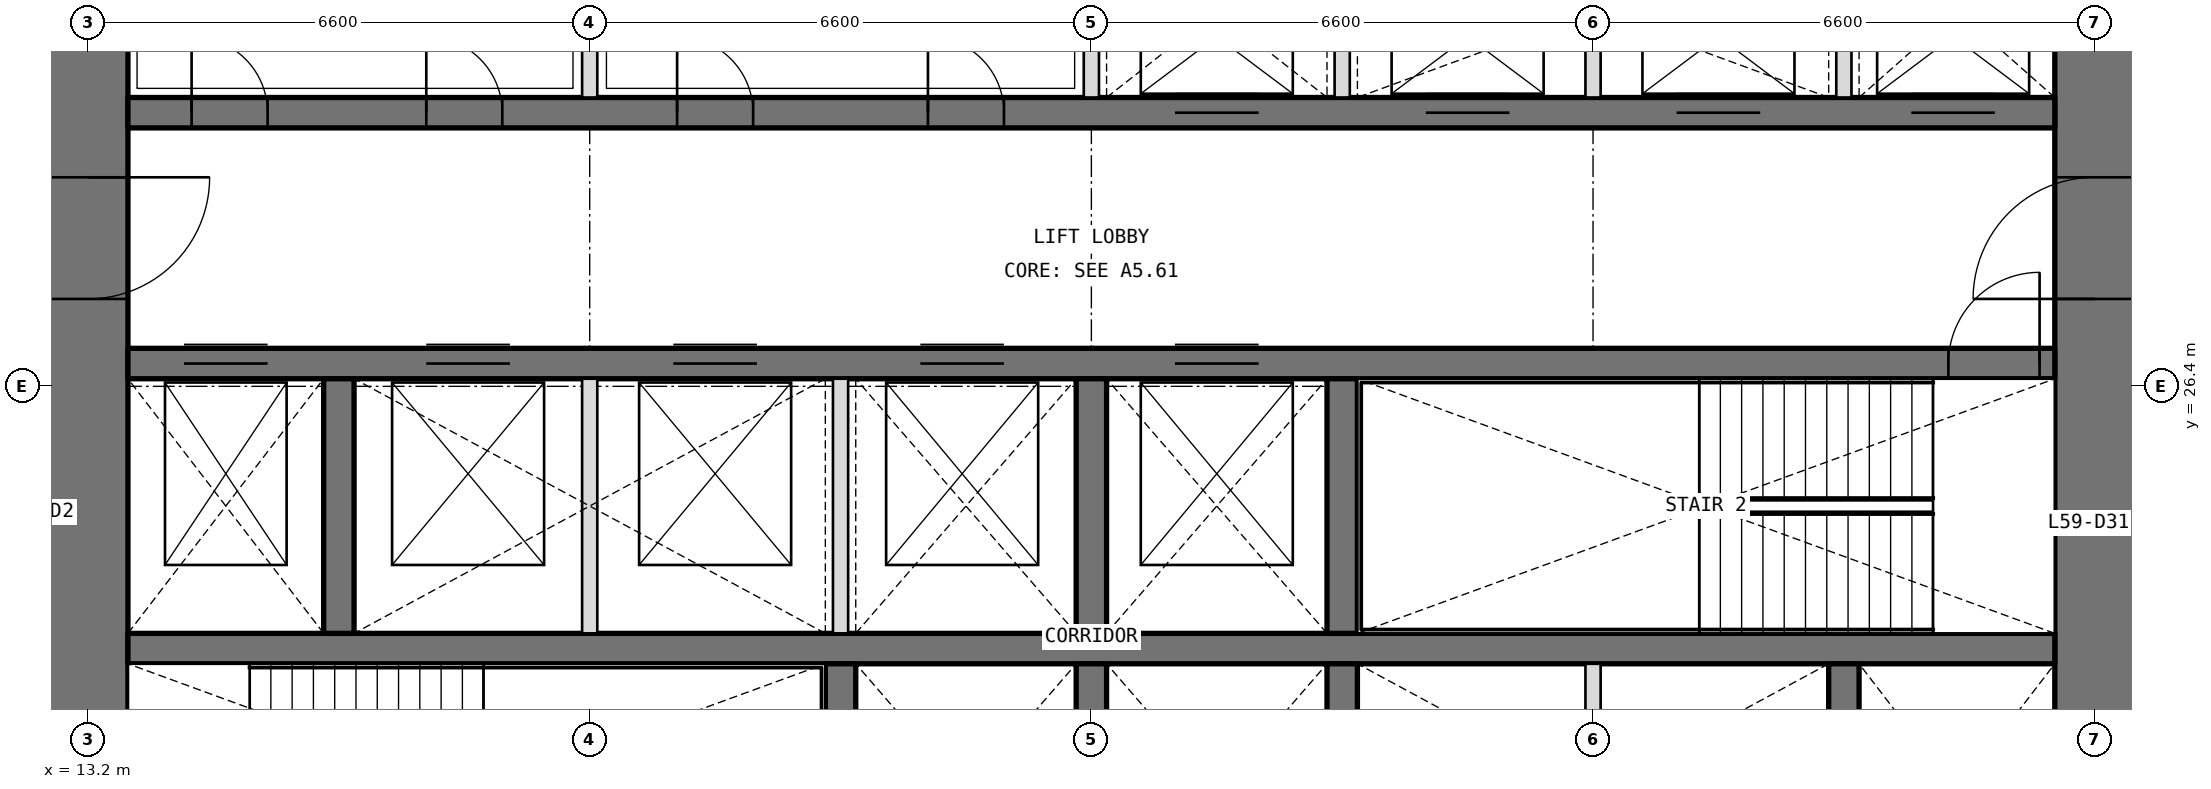
"""IFC4 building model, lengths in metres.
Left out: names, types, materials, properties, quantities, classifications, styles, units other than length and angle.
Written with IfcOpenShell. Run it as: python <this file> out.ifc"""

import sys

from ifc_helpers import new_model, si_unit, direction, frame, frame_2d, origin, place, context, subcontext, project, spatial, rectangle, extrude, element, fill, save


model = new_model("IFC4")
c1 = context("Model", 3, precision=1e-05, world=origin(), true_north=direction((0.0, 1.0)))
c2 = subcontext(c1, "Body", "Model", "MODEL_VIEW")
j1 = project(units=[si_unit("LENGTHUNIT", "METRE"), si_unit("PLANEANGLEUNIT", "RADIAN")], contexts=[c1])
p1 = place(None, origin())
s1 = spatial("IfcSite", under=j1, at=p1, CompositionType="ELEMENT")
p2 = place(p1, origin())
s2 = spatial("IfcBuilding", under=s1, at=p2, CompositionType="ELEMENT")
p3 = place(p2, frame((0.0, 0.0, 258.6)))
s3 = spatial("IfcBuildingStorey", under=s2, at=p3, CompositionType="ELEMENT", Elevation=258.6)
p4 = place(p3, frame((39.6, 13.725, 0.0), z_axis=(0.0, 0.0, 1.0), x_axis=(0.0, 1.0, 0.0)))
e1 = element("IfcWall", 1, at=p4, inside=s3, PredefinedType="SHEAR", context=c2, shape_type="SweptSolid", body=[
    extrude(rectangle(XDim=18.75, YDim=1.05, at=frame_2d((9.375, 0.0))), origin(), (0.0, 0.0, 1.0), 4.2),
])
p5 = place(p4, frame((3.025, 0.0, 0.0)))
e2 = element("IfcOpeningElement", 2, at=p5, cuts=e1, PredefinedType="OPENING", context=c2, shape_type="SweptSolid", body=[
    extrude(rectangle(XDim=1.6, YDim=2.1, at=frame_2d((0.8, 1.05))), frame((0.0, 0.535, 0.0), z_axis=(0.0, -1.0, 0.0), x_axis=(1.0, 0.0, 0.0)), (0.0, 0.0, 1.0), 1.07),
])
p6 = place(p4, frame((13.825, 0.0, 0.0)))
e3 = element("IfcOpeningElement", 3, at=p6, cuts=e1, PredefinedType="OPENING", context=c2, shape_type="SweptSolid", body=[
    extrude(rectangle(XDim=1.6, YDim=2.1, at=frame_2d((0.8, 1.05))), frame((0.0, 0.535, 0.0), z_axis=(0.0, -1.0, 0.0), x_axis=(1.0, 0.0, 0.0)), (0.0, 0.0, 1.0), 1.07),
])
p7 = place(p3, frame((13.2, 32.475, 0.0), z_axis=(0.0, 0.0, 1.0), x_axis=(0.0, -1.0, 0.0)))
e4 = element("IfcWall", 4, at=p7, inside=s3, PredefinedType="SHEAR", context=c2, shape_type="SweptSolid", body=[
    extrude(rectangle(XDim=18.75, YDim=1.05, at=frame_2d((9.375, 0.0))), origin(), (0.0, 0.0, 1.0), 4.2),
])
p8 = place(p7, frame((14.125, 0.0, 0.0)))
e5 = element("IfcOpeningElement", 5, at=p8, cuts=e4, PredefinedType="OPENING", context=c2, shape_type="SweptSolid", body=[
    extrude(rectangle(XDim=1.6, YDim=2.1, at=frame_2d((0.8, 1.05))), frame((0.0, 0.535, 0.0), z_axis=(0.0, -1.0, 0.0), x_axis=(1.0, 0.0, 0.0)), (0.0, 0.0, 1.0), 1.07),
])
p9 = place(p7, frame((3.325, 0.0, 0.0)))
e6 = element("IfcOpeningElement", 6, at=p9, cuts=e4, PredefinedType="OPENING", context=c2, shape_type="SweptSolid", body=[
    extrude(rectangle(XDim=1.6, YDim=2.1, at=frame_2d((0.8, 1.05))), frame((0.0, 0.535, 0.0), z_axis=(0.0, -1.0, 0.0), x_axis=(1.0, 0.0, 0.0)), (0.0, 0.0, 1.0), 1.07),
])
p10 = place(p3, frame((13.725, 22.95, 0.0), z_axis=(0.0, 0.0, 1.0), x_axis=(1.0, 0.0, 0.0)))
e7 = element("IfcWall", 7, at=p10, inside=s3, PredefinedType="SHEAR", context=c2, shape_type="SweptSolid", body=[
    extrude(rectangle(XDim=25.35, YDim=0.4, at=frame_2d((12.675, 0.0))), origin(), (0.0, 0.0, 1.0), 4.2),
])
p11 = place(p3, frame((13.725, 26.7, 0.0), z_axis=(0.0, 0.0, 1.0), x_axis=(1.0, 0.0, 0.0)))
e8 = element("IfcWall", 8, at=p11, inside=s3, PredefinedType="SHEAR", context=c2, shape_type="SweptSolid", body=[
    extrude(rectangle(XDim=25.35, YDim=0.4, at=frame_2d((12.675, 0.0))), origin(), (0.0, 0.0, 1.0), 4.2),
])
p12 = place(p11, frame((23.95, 0.0, 0.0)))
e9 = element("IfcOpeningElement", 9, at=p12, cuts=e8, PredefinedType="OPENING", context=c2, shape_type="SweptSolid", body=[
    extrude(rectangle(XDim=1.2, YDim=2.1, at=frame_2d((0.6, 1.05))), frame((0.0, 0.21, 0.0), z_axis=(0.0, -1.0, 0.0), x_axis=(1.0, 0.0, 0.0)), (0.0, 0.0, 1.0), 0.42),
])
p13 = place(p11, frame((0.738, 0.0, 0.0)))
e10 = element("IfcOpeningElement", 10, at=p13, cuts=e8, PredefinedType="OPENING", context=c2, shape_type="SweptSolid", body=[
    extrude(rectangle(XDim=1.1, YDim=2.1, at=frame_2d((0.55, 1.05))), frame((0.0, 0.21, 0.0), z_axis=(0.0, -1.0, 0.0), x_axis=(1.0, 0.0, 0.0)), (0.0, 0.0, 1.0), 0.42),
])
p14 = place(p11, frame((3.925, 0.0, 0.0)))
e11 = element("IfcOpeningElement", 11, at=p14, cuts=e8, PredefinedType="OPENING", context=c2, shape_type="SweptSolid", body=[
    extrude(rectangle(XDim=1.1, YDim=2.1, at=frame_2d((0.55, 1.05))), frame((0.0, 0.21, 0.0), z_axis=(0.0, -1.0, 0.0), x_axis=(1.0, 0.0, 0.0)), (0.0, 0.0, 1.0), 0.42),
])
p15 = place(p11, frame((7.175, 0.0, 0.0)))
e12 = element("IfcOpeningElement", 12, at=p15, cuts=e8, PredefinedType="OPENING", context=c2, shape_type="SweptSolid", body=[
    extrude(rectangle(XDim=1.1, YDim=2.1, at=frame_2d((0.55, 1.05))), frame((0.0, 0.21, 0.0), z_axis=(0.0, -1.0, 0.0), x_axis=(1.0, 0.0, 0.0)), (0.0, 0.0, 1.0), 0.42),
])
p16 = place(p11, frame((10.425, 0.0, 0.0)))
e13 = element("IfcOpeningElement", 13, at=p16, cuts=e8, PredefinedType="OPENING", context=c2, shape_type="SweptSolid", body=[
    extrude(rectangle(XDim=1.1, YDim=2.1, at=frame_2d((0.55, 1.05))), frame((0.0, 0.21, 0.0), z_axis=(0.0, -1.0, 0.0), x_axis=(1.0, 0.0, 0.0)), (0.0, 0.0, 1.0), 0.42),
])
p17 = place(p11, frame((13.775, 0.0, 0.0)))
e14 = element("IfcOpeningElement", 14, at=p17, cuts=e8, PredefinedType="OPENING", context=c2, shape_type="SweptSolid", body=[
    extrude(rectangle(XDim=1.1, YDim=2.1, at=frame_2d((0.55, 1.05))), frame((0.0, 0.21, 0.0), z_axis=(0.0, -1.0, 0.0), x_axis=(1.0, 0.0, 0.0)), (0.0, 0.0, 1.0), 0.42),
])
p18 = place(p3, frame((13.725, 30.0, 0.0), z_axis=(0.0, 0.0, 1.0), x_axis=(1.0, 0.0, 0.0)))
e15 = element("IfcWall", 15, at=p18, inside=s3, PredefinedType="SHEAR", context=c2, shape_type="SweptSolid", body=[
    extrude(rectangle(XDim=25.35, YDim=0.4, at=frame_2d((12.675, 0.0))), origin(), (0.0, 0.0, 1.0), 4.2),
])
p19 = place(p18, frame((0.837, 0.0, 0.0)))
e16 = element("IfcOpeningElement", 16, at=p19, cuts=e15, PredefinedType="OPENING", context=c2, shape_type="SweptSolid", body=[
    extrude(rectangle(XDim=1.0, YDim=2.1, at=frame_2d((0.5, 1.05))), frame((0.0, 0.21, 0.0), z_axis=(0.0, -1.0, 0.0), x_axis=(1.0, 0.0, 0.0)), (0.0, 0.0, 1.0), 0.42),
])
p20 = place(p18, frame((3.925, 0.0, 0.0)))
e17 = element("IfcOpeningElement", 17, at=p20, cuts=e15, PredefinedType="OPENING", context=c2, shape_type="SweptSolid", body=[
    extrude(rectangle(XDim=1.0, YDim=2.1, at=frame_2d((0.5, 1.05))), frame((0.0, 0.21, 0.0), z_axis=(0.0, -1.0, 0.0), x_axis=(1.0, 0.0, 0.0)), (0.0, 0.0, 1.0), 0.42),
])
p21 = place(p18, frame((7.225, 0.0, 0.0)))
e18 = element("IfcOpeningElement", 18, at=p21, cuts=e15, PredefinedType="OPENING", context=c2, shape_type="SweptSolid", body=[
    extrude(rectangle(XDim=1.0, YDim=2.1, at=frame_2d((0.5, 1.05))), frame((0.0, 0.21, 0.0), z_axis=(0.0, -1.0, 0.0), x_axis=(1.0, 0.0, 0.0)), (0.0, 0.0, 1.0), 0.42),
])
p22 = place(p18, frame((10.525, 0.0, 0.0)))
e19 = element("IfcOpeningElement", 19, at=p22, cuts=e15, PredefinedType="OPENING", context=c2, shape_type="SweptSolid", body=[
    extrude(rectangle(XDim=1.0, YDim=2.1, at=frame_2d((0.5, 1.05))), frame((0.0, 0.21, 0.0), z_axis=(0.0, -1.0, 0.0), x_axis=(1.0, 0.0, 0.0)), (0.0, 0.0, 1.0), 0.42),
])
p23 = place(p18, frame((13.775, 0.0, 0.0)))
e20 = element("IfcOpeningElement", 20, at=p23, cuts=e15, PredefinedType="OPENING", context=c2, shape_type="SweptSolid", body=[
    extrude(rectangle(XDim=1.1, YDim=2.1, at=frame_2d((0.55, 1.05))), frame((0.0, 0.21, 0.0), z_axis=(0.0, -1.0, 0.0), x_axis=(1.0, 0.0, 0.0)), (0.0, 0.0, 1.0), 0.42),
])
p24 = place(p18, frame((17.075, 0.0, 0.0)))
e21 = element("IfcOpeningElement", 21, at=p24, cuts=e15, PredefinedType="OPENING", context=c2, shape_type="SweptSolid", body=[
    extrude(rectangle(XDim=1.1, YDim=2.1, at=frame_2d((0.55, 1.05))), frame((0.0, 0.21, 0.0), z_axis=(0.0, -1.0, 0.0), x_axis=(1.0, 0.0, 0.0)), (0.0, 0.0, 1.0), 0.42),
])
p25 = place(p18, frame((20.375, 0.0, 0.0)))
e22 = element("IfcOpeningElement", 22, at=p25, cuts=e15, PredefinedType="OPENING", context=c2, shape_type="SweptSolid", body=[
    extrude(rectangle(XDim=1.1, YDim=2.1, at=frame_2d((0.55, 1.05))), frame((0.0, 0.21, 0.0), z_axis=(0.0, -1.0, 0.0), x_axis=(1.0, 0.0, 0.0)), (0.0, 0.0, 1.0), 0.42),
])
p26 = place(p18, frame((23.462, 0.0, 0.0)))
e23 = element("IfcOpeningElement", 23, at=p26, cuts=e15, PredefinedType="OPENING", context=c2, shape_type="SweptSolid", body=[
    extrude(rectangle(XDim=1.1, YDim=2.1, at=frame_2d((0.55, 1.05))), frame((0.0, 0.21, 0.0), z_axis=(0.0, -1.0, 0.0), x_axis=(1.0, 0.0, 0.0)), (0.0, 0.0, 1.0), 0.42),
])
for number, where, z_axis, x_axis in (
    (24, (23.1, 19.4, 0.0), (0.0, 0.0, 1.0), (0.0, 1.0, 0.0)),
    (25, (26.4, 19.4, 0.0), (0.0, 0.0, 1.0), (0.0, 1.0, 0.0)),
    (26, (29.7, 19.4, 0.0), (0.0, 0.0, 1.0), (0.0, 1.0, 0.0)),
    (27, (36.3, 19.4, 0.0), (0.0, 0.0, 1.0), (0.0, 1.0, 0.0)),
    (28, (16.5, 23.15, 0.0), (0.0, 0.0, 1.0), (0.0, 1.0, 0.0)),
    (29, (26.4, 23.15, 0.0), (0.0, 0.0, 1.0), (0.0, 1.0, 0.0)),
    (30, (29.7, 23.15, 0.0), (0.0, 0.0, 1.0), (0.0, 1.0, 0.0)),
):
    element("IfcWall", number, at=place(p3, frame(where, z_axis=z_axis, x_axis=x_axis)), inside=s3, PredefinedType="SHEAR", context=c2, shape_type="SweptSolid", body=[
        extrude(rectangle(XDim=3.35, YDim=0.4, at=frame_2d((1.675, 0.0))), origin(), (0.0, 0.0, 1.0), 4.2),
    ])
for number, where, z_axis, x_axis in (
    (31, (19.8, 30.2, 0.0), (0.0, 0.0, 1.0), (0.0, 1.0, 0.0)),
    (32, (26.4, 30.2, 0.0), (0.0, 0.0, 1.0), (0.0, 1.0, 0.0)),
    (33, (29.7, 30.2, 0.0), (0.0, 0.0, 1.0), (0.0, 1.0, 0.0)),
    (34, (33.0, 30.2, 0.0), (0.0, 0.0, 1.0), (0.0, 1.0, 0.0)),
    (35, (36.3, 30.2, 0.0), (0.0, 0.0, 1.0), (0.0, 1.0, 0.0)),
):
    element("IfcWall", number, at=place(p3, frame(where, z_axis=z_axis, x_axis=x_axis)), inside=s3, PredefinedType="PARTITIONING", context=c2, shape_type="SweptSolid", body=[
        extrude(rectangle(XDim=2.275, YDim=0.2, at=frame_2d((1.138, 0.0))), origin(), (0.0, 0.0, 1.0), 4.2),
    ])
for number, where, z_axis, x_axis in (
    (36, (33.0, 19.4, 0.0), (0.0, 0.0, 1.0), (0.0, 1.0, 0.0)),
    (37, (19.8, 23.15, 0.0), (0.0, 0.0, 1.0), (0.0, 1.0, 0.0)),
    (38, (23.1, 23.15, 0.0), (0.0, 0.0, 1.0), (0.0, 1.0, 0.0)),
):
    element("IfcWall", number, at=place(p3, frame(where, z_axis=z_axis, x_axis=x_axis)), inside=s3, PredefinedType="PARTITIONING", context=c2, shape_type="SweptSolid", body=[
        extrude(rectangle(XDim=3.35, YDim=0.2, at=frame_2d((1.675, 0.0))), origin(), (0.0, 0.0, 1.0), 4.2),
    ])
p27 = place(p19, origin())
e39 = element("IfcDoor", 39, at=p27, inside=s3, OperationType="SINGLE_SWING_LEFT", PredefinedType="DOOR", context=c2, shape_type="SweptSolid", body=[
    extrude(rectangle(XDim=1.0, YDim=2.1, at=frame_2d((0.5, 1.05))), frame((0.0, 0.025, 0.0), z_axis=(0.0, -1.0, 0.0), x_axis=(1.0, 0.0, 0.0)), (0.0, 0.0, 1.0), 0.05),
])
fill(e16, e39)
p28 = place(p20, origin())
e40 = element("IfcDoor", 40, at=p28, inside=s3, OperationType="SINGLE_SWING_LEFT", PredefinedType="DOOR", context=c2, shape_type="SweptSolid", body=[
    extrude(rectangle(XDim=1.0, YDim=2.1, at=frame_2d((0.5, 1.05))), frame((0.0, 0.025, 0.0), z_axis=(0.0, -1.0, 0.0), x_axis=(1.0, 0.0, 0.0)), (0.0, 0.0, 1.0), 0.05),
])
fill(e17, e40)
p29 = place(p21, origin())
e41 = element("IfcDoor", 41, at=p29, inside=s3, OperationType="SINGLE_SWING_LEFT", PredefinedType="DOOR", context=c2, shape_type="SweptSolid", body=[
    extrude(rectangle(XDim=1.0, YDim=2.1, at=frame_2d((0.5, 1.05))), frame((0.0, 0.025, 0.0), z_axis=(0.0, -1.0, 0.0), x_axis=(1.0, 0.0, 0.0)), (0.0, 0.0, 1.0), 0.05),
])
fill(e18, e41)
p30 = place(p22, origin())
e42 = element("IfcDoor", 42, at=p30, inside=s3, OperationType="SINGLE_SWING_LEFT", PredefinedType="DOOR", context=c2, shape_type="SweptSolid", body=[
    extrude(rectangle(XDim=1.0, YDim=2.1, at=frame_2d((0.5, 1.05))), frame((0.0, 0.025, 0.0), z_axis=(0.0, -1.0, 0.0), x_axis=(1.0, 0.0, 0.0)), (0.0, 0.0, 1.0), 0.05),
])
fill(e19, e42)
p31 = place(p12, origin())
e43 = element("IfcDoor", 43, at=p31, inside=s3, OperationType="SINGLE_SWING_RIGHT", PredefinedType="DOOR", context=c2, shape_type="SweptSolid", body=[
    extrude(rectangle(XDim=1.2, YDim=2.1, at=frame_2d((0.6, 1.05))), frame((0.0, 0.025, 0.0), z_axis=(0.0, -1.0, 0.0), x_axis=(1.0, 0.0, 0.0)), (0.0, 0.0, 1.0), 0.05),
])
fill(e9, e43)
p32 = place(p9, origin())
e44 = element("IfcDoor", 44, at=p32, inside=s3, OperationType="DOUBLE_DOOR_DOUBLE_SWING", PredefinedType="DOOR", context=c2, shape_type="SweptSolid", body=[
    extrude(rectangle(XDim=1.6, YDim=2.1, at=frame_2d((0.8, 1.05))), frame((0.0, 0.025, 0.0), z_axis=(0.0, -1.0, 0.0), x_axis=(1.0, 0.0, 0.0)), (0.0, 0.0, 1.0), 0.05),
])
fill(e6, e44)
p33 = place(p6, origin())
e45 = element("IfcDoor", 45, at=p33, inside=s3, OperationType="DOUBLE_DOOR_DOUBLE_SWING", PredefinedType="DOOR", context=c2, shape_type="SweptSolid", body=[
    extrude(rectangle(XDim=1.6, YDim=2.1, at=frame_2d((0.8, 1.05))), frame((0.0, 0.025, 0.0), z_axis=(0.0, -1.0, 0.0), x_axis=(1.0, 0.0, 0.0)), (0.0, 0.0, 1.0), 0.05),
])
fill(e3, e45)
p34 = place(p23, origin())
e46 = element("IfcDoor", 46, at=p34, inside=s3, OperationType="DOUBLE_DOOR_SLIDING", PredefinedType="DOOR", context=c2, shape_type="SweptSolid", body=[
    extrude(rectangle(XDim=1.1, YDim=2.1, at=frame_2d((0.55, 1.05))), frame((0.0, 0.025, 0.0), z_axis=(0.0, -1.0, 0.0), x_axis=(1.0, 0.0, 0.0)), (0.0, 0.0, 1.0), 0.05),
])
fill(e20, e46)
p35 = place(p24, origin())
e47 = element("IfcDoor", 47, at=p35, inside=s3, OperationType="DOUBLE_DOOR_SLIDING", PredefinedType="DOOR", context=c2, shape_type="SweptSolid", body=[
    extrude(rectangle(XDim=1.1, YDim=2.1, at=frame_2d((0.55, 1.05))), frame((0.0, 0.025, 0.0), z_axis=(0.0, -1.0, 0.0), x_axis=(1.0, 0.0, 0.0)), (0.0, 0.0, 1.0), 0.05),
])
fill(e21, e47)
p36 = place(p25, origin())
e48 = element("IfcDoor", 48, at=p36, inside=s3, OperationType="DOUBLE_DOOR_SLIDING", PredefinedType="DOOR", context=c2, shape_type="SweptSolid", body=[
    extrude(rectangle(XDim=1.1, YDim=2.1, at=frame_2d((0.55, 1.05))), frame((0.0, 0.025, 0.0), z_axis=(0.0, -1.0, 0.0), x_axis=(1.0, 0.0, 0.0)), (0.0, 0.0, 1.0), 0.05),
])
fill(e22, e48)
p37 = place(p26, origin())
e49 = element("IfcDoor", 49, at=p37, inside=s3, OperationType="DOUBLE_DOOR_SLIDING", PredefinedType="DOOR", context=c2, shape_type="SweptSolid", body=[
    extrude(rectangle(XDim=1.1, YDim=2.1, at=frame_2d((0.55, 1.05))), frame((0.0, 0.025, 0.0), z_axis=(0.0, -1.0, 0.0), x_axis=(1.0, 0.0, 0.0)), (0.0, 0.0, 1.0), 0.05),
])
fill(e23, e49)
p38 = place(p13, origin())
e50 = element("IfcDoor", 50, at=p38, inside=s3, OperationType="DOUBLE_DOOR_SLIDING", PredefinedType="DOOR", context=c2, shape_type="SweptSolid", body=[
    extrude(rectangle(XDim=1.1, YDim=2.1, at=frame_2d((0.55, 1.05))), frame((0.0, 0.025, 0.0), z_axis=(0.0, -1.0, 0.0), x_axis=(1.0, 0.0, 0.0)), (0.0, 0.0, 1.0), 0.05),
])
fill(e10, e50)
p39 = place(p14, origin())
e51 = element("IfcDoor", 51, at=p39, inside=s3, OperationType="DOUBLE_DOOR_SLIDING", PredefinedType="DOOR", context=c2, shape_type="SweptSolid", body=[
    extrude(rectangle(XDim=1.1, YDim=2.1, at=frame_2d((0.55, 1.05))), frame((0.0, 0.025, 0.0), z_axis=(0.0, -1.0, 0.0), x_axis=(1.0, 0.0, 0.0)), (0.0, 0.0, 1.0), 0.05),
])
fill(e11, e51)
p40 = place(p15, origin())
e52 = element("IfcDoor", 52, at=p40, inside=s3, OperationType="DOUBLE_DOOR_SLIDING", PredefinedType="DOOR", context=c2, shape_type="SweptSolid", body=[
    extrude(rectangle(XDim=1.1, YDim=2.1, at=frame_2d((0.55, 1.05))), frame((0.0, 0.025, 0.0), z_axis=(0.0, -1.0, 0.0), x_axis=(1.0, 0.0, 0.0)), (0.0, 0.0, 1.0), 0.05),
])
fill(e12, e52)
p41 = place(p16, origin())
e53 = element("IfcDoor", 53, at=p41, inside=s3, OperationType="DOUBLE_DOOR_SLIDING", PredefinedType="DOOR", context=c2, shape_type="SweptSolid", body=[
    extrude(rectangle(XDim=1.1, YDim=2.1, at=frame_2d((0.55, 1.05))), frame((0.0, 0.025, 0.0), z_axis=(0.0, -1.0, 0.0), x_axis=(1.0, 0.0, 0.0)), (0.0, 0.0, 1.0), 0.05),
])
fill(e13, e53)
p42 = place(p17, origin())
e54 = element("IfcDoor", 54, at=p42, inside=s3, OperationType="DOUBLE_DOOR_SLIDING", PredefinedType="DOOR", context=c2, shape_type="SweptSolid", body=[
    extrude(rectangle(XDim=1.1, YDim=2.1, at=frame_2d((0.55, 1.05))), frame((0.0, 0.025, 0.0), z_axis=(0.0, -1.0, 0.0), x_axis=(1.0, 0.0, 0.0)), (0.0, 0.0, 1.0), 0.05),
])
fill(e14, e54)
save(model, sys.argv[1])
